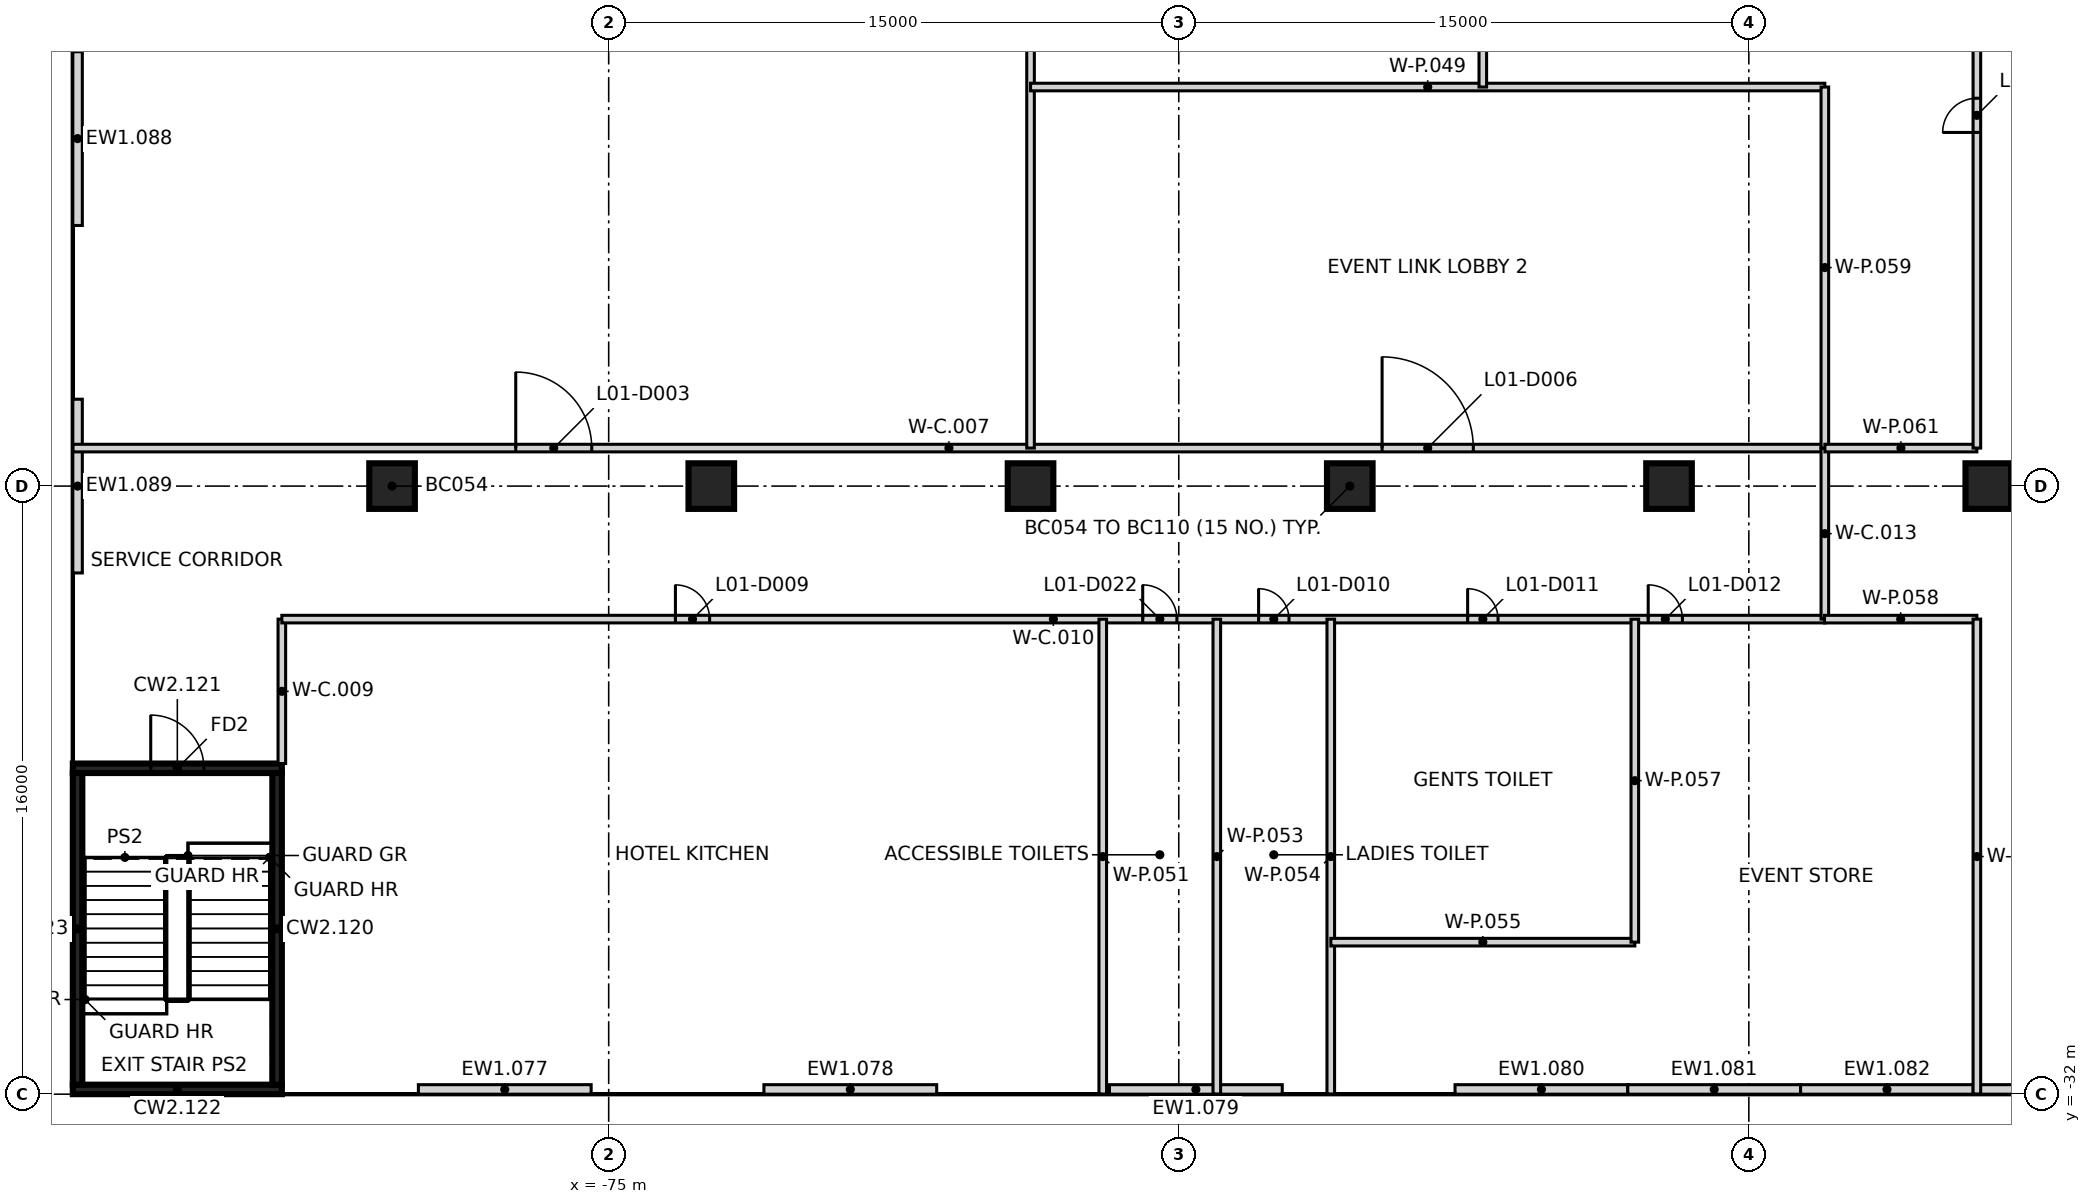
"""IFC4 building model, lengths in metres.
Left out: names, types, materials, properties, quantities, classifications, styles, units other than length and angle.
Written with IfcOpenShell. Run it as: python <this file> out.ifc"""

import sys

from ifc_helpers import new_model, si_unit, direction, frame, frame_2d, origin, origin_2d, place, context, subcontext, project, spatial, rectangle, extrude, element, fill, save


model = new_model("IFC4")
c1 = context("Model", 3, precision=1e-05, world=origin(), true_north=direction((0.0, 1.0)))
c2 = subcontext(c1, "Body", "Model", "MODEL_VIEW")
j1 = project(units=[si_unit("LENGTHUNIT", "METRE"), si_unit("PLANEANGLEUNIT", "RADIAN")], contexts=[c1])
p1 = place(None, origin())
s1 = spatial("IfcSite", under=j1, at=p1, CompositionType="ELEMENT")
p2 = place(p1, origin())
s2 = spatial("IfcBuilding", under=s1, at=p2, CompositionType="ELEMENT")
p3 = place(p2, frame((0.0, 0.0, 7.5)))
s3 = spatial("IfcBuildingStorey", under=s2, at=p3, CompositionType="ELEMENT", Elevation=7.5)
for number, where, z_axis, x_axis in (
    (1, (-80.7, -16.0, -0.4), (0.0, 0.0, 1.0), (1.0, 0.0, 0.0)),
    (2, (-72.3, -16.0, -0.4), (0.0, 0.0, 1.0), (1.0, 0.0, 0.0)),
    (3, (-63.9, -16.0, -0.4), (0.0, 0.0, 1.0), (1.0, 0.0, 0.0)),
    (4, (-55.5, -16.0, -0.4), (0.0, 0.0, 1.0), (1.0, 0.0, 0.0)),
    (5, (-47.1, -16.0, -0.4), (0.0, 0.0, 1.0), (1.0, 0.0, 0.0)),
    (6, (-38.7, -16.0, -0.4), (0.0, 0.0, 1.0), (1.0, 0.0, 0.0)),
):
    element("IfcColumn", number, at=place(p3, frame(where, z_axis=z_axis, x_axis=x_axis)), inside=s3, PredefinedType="COLUMN", context=c2, shape_type="SweptSolid", body=[
        extrude(rectangle(XDim=1.2, YDim=1.2, at=origin_2d()), origin(), (0.0, 0.0, 1.0), 6.55),
    ])
for number, where, z_axis, x_axis in (
    (7, (-88.975, -9.143, 0.0), (0.0, 0.0, 1.0), (0.0, 1.0, 0.0)),
    (8, (-88.975, -18.286, 0.0), (0.0, 0.0, 1.0), (0.0, 1.0, 0.0)),
):
    element("IfcWall", number, at=place(p3, frame(where, z_axis=z_axis, x_axis=x_axis)), inside=s3, PredefinedType="SOLIDWALL", context=c2, shape_type="SweptSolid", body=[
        extrude(rectangle(XDim=4.571, YDim=0.25, at=frame_2d((2.286, 0.0))), origin(), (0.0, 0.0, 1.0), 6.15),
    ])
p4 = place(p3, frame((-75.461, -31.875, 0.0), z_axis=(0.0, 0.0, 1.0), x_axis=(-1.0, 0.0, 0.0)))
e9 = element("IfcWall", 9, at=p4, inside=s3, PredefinedType="SOLIDWALL", context=c2, shape_type="SweptSolid", body=[
    extrude(rectangle(XDim=4.546, YDim=0.25, at=frame_2d((2.273, 0.0))), origin(), (0.0, 0.0, 1.0), 6.15),
])
for number, where, z_axis, x_axis in (
    (10, (-66.369, -31.875, 0.0), (0.0, 0.0, 1.0), (-1.0, 0.0, 0.0)),
    (11, (-57.277, -31.875, 0.0), (0.0, 0.0, 1.0), (-1.0, 0.0, 0.0)),
    (12, (-48.185, -31.875, 0.0), (0.0, 0.0, 1.0), (-1.0, 0.0, 0.0)),
    (13, (-43.638, -31.875, 0.0), (0.0, 0.0, 1.0), (-1.0, 0.0, 0.0)),
    (14, (-39.092, -31.875, 0.0), (0.0, 0.0, 1.0), (-1.0, 0.0, 0.0)),
    (15, (-34.546, -31.875, 0.0), (0.0, 0.0, 1.0), (-1.0, 0.0, 0.0)),
):
    element("IfcWall", number, at=place(p3, frame(where, z_axis=z_axis, x_axis=x_axis)), inside=s3, PredefinedType="SOLIDWALL", context=c2, shape_type="SweptSolid", body=[
        extrude(rectangle(XDim=4.546, YDim=0.25, at=frame_2d((2.273, 0.0))), origin(), (0.0, 0.0, 1.0), 6.15),
    ])
p5 = place(p3, frame((-89.1, -31.875, 0.0), z_axis=(0.0, 0.0, 1.0), x_axis=(1.0, 0.0, 0.0)))
e16 = element("IfcWall", 16, at=p5, inside=s3, PredefinedType="SHEAR", context=c2, shape_type="SweptSolid", body=[
    extrude(rectangle(XDim=5.5, YDim=0.25, at=frame_2d((2.75, 0.0))), origin(), (0.0, 0.0, 1.0), 6.15),
])
p6 = place(p3, frame((-89.1, -23.425, 0.0), z_axis=(0.0, 0.0, 1.0), x_axis=(1.0, 0.0, 0.0)))
e17 = element("IfcWall", 17, at=p6, inside=s3, PredefinedType="SHEAR", context=c2, shape_type="SweptSolid", body=[
    extrude(rectangle(XDim=5.5, YDim=0.25, at=frame_2d((2.75, 0.0))), origin(), (0.0, 0.0, 1.0), 6.15),
])
p7 = place(p6, frame((2.05, 0.0, 0.0)))
e18 = element("IfcOpeningElement", 18, at=p7, cuts=e17, PredefinedType="OPENING", context=c2, shape_type="SweptSolid", body=[
    extrude(rectangle(XDim=1.4, YDim=2.1, at=frame_2d((0.7, 1.05))), frame((0.0, 0.135, 0.0), z_axis=(0.0, -1.0, 0.0), x_axis=(1.0, 0.0, 0.0)), (0.0, 0.0, 1.0), 0.27),
])
for number, where, z_axis, x_axis in (
    (19, (-88.975, -31.75, 0.0), (0.0, 0.0, 1.0), (0.0, 1.0, 0.0)),
    (20, (-83.725, -31.75, 0.0), (0.0, 0.0, 1.0), (0.0, 1.0, 0.0)),
):
    element("IfcWall", number, at=place(p3, frame(where, z_axis=z_axis, x_axis=x_axis)), inside=s3, PredefinedType="SHEAR", context=c2, shape_type="SweptSolid", body=[
        extrude(rectangle(XDim=8.2, YDim=0.25, at=frame_2d((4.1, 0.0))), origin(), (0.0, 0.0, 1.0), 6.15),
    ])
p8 = place(p3, frame((-89.095, -15.0, 0.0), z_axis=(0.0, 0.0, 1.0), x_axis=(1.0, 0.0, 0.0)))
e21 = element("IfcWall", 21, at=p8, inside=s3, PredefinedType="PARTITIONING", context=c2, shape_type="SweptSolid", body=[
    extrude(rectangle(XDim=46.095, YDim=0.2, at=frame_2d((23.047, 0.0))), origin(), (0.0, 0.0, 1.0), 6.15),
])
p9 = place(p8, frame((11.649, 0.0, 0.0)))
e22 = element("IfcOpeningElement", 22, at=p9, cuts=e21, PredefinedType="OPENING", context=c2, shape_type="SweptSolid", body=[
    extrude(rectangle(XDim=2.0, YDim=2.1, at=frame_2d((1.0, 1.05))), frame((0.0, 0.11, 0.0), z_axis=(0.0, -1.0, 0.0), x_axis=(1.0, 0.0, 0.0)), (0.0, 0.0, 1.0), 0.22),
])
p10 = place(p8, frame((34.445, 0.0, 0.0)))
e23 = element("IfcOpeningElement", 23, at=p10, cuts=e21, PredefinedType="OPENING", context=c2, shape_type="SweptSolid", body=[
    extrude(rectangle(XDim=2.4, YDim=2.1, at=frame_2d((1.2, 1.05))), frame((0.0, 0.11, 0.0), z_axis=(0.0, -1.0, 0.0), x_axis=(1.0, 0.0, 0.0)), (0.0, 0.0, 1.0), 0.22),
])
p11 = place(p3, frame((-83.6, -23.3, 0.0), z_axis=(0.0, 0.0, 1.0), x_axis=(0.0, 1.0, 0.0)))
e24 = element("IfcWall", 24, at=p11, inside=s3, PredefinedType="PARTITIONING", context=c2, shape_type="SweptSolid", body=[
    extrude(rectangle(XDim=3.8, YDim=0.2, at=frame_2d((1.9, 0.0))), origin(), (0.0, 0.0, 1.0), 6.15),
])
p12 = place(p3, frame((-83.6, -19.5, 0.0), z_axis=(0.0, 0.0, 1.0), x_axis=(1.0, 0.0, 0.0)))
e25 = element("IfcWall", 25, at=p12, inside=s3, PredefinedType="PARTITIONING", context=c2, shape_type="SweptSolid", body=[
    extrude(rectangle(XDim=40.6, YDim=0.2, at=frame_2d((20.3, 0.0))), origin(), (0.0, 0.0, 1.0), 6.15),
])
p13 = place(p12, frame((10.356, 0.0, 0.0)))
e26 = element("IfcOpeningElement", 26, at=p13, cuts=e25, PredefinedType="OPENING", context=c2, shape_type="SweptSolid", body=[
    extrude(rectangle(XDim=0.9, YDim=2.1, at=frame_2d((0.45, 1.05))), frame((0.0, 0.11, 0.0), z_axis=(0.0, -1.0, 0.0), x_axis=(1.0, 0.0, 0.0)), (0.0, 0.0, 1.0), 0.22),
])
p14 = place(p12, frame((25.7, 0.0, 0.0)))
e27 = element("IfcOpeningElement", 27, at=p14, cuts=e25, PredefinedType="OPENING", context=c2, shape_type="SweptSolid", body=[
    extrude(rectangle(XDim=0.8, YDim=2.1, at=frame_2d((0.4, 1.05))), frame((0.0, 0.11, 0.0), z_axis=(0.0, -1.0, 0.0), x_axis=(1.0, 0.0, 0.0)), (0.0, 0.0, 1.0), 0.22),
])
p15 = place(p12, frame((31.201, 0.0, 0.0)))
e28 = element("IfcOpeningElement", 28, at=p15, cuts=e25, PredefinedType="OPENING", context=c2, shape_type="SweptSolid", body=[
    extrude(rectangle(XDim=0.8, YDim=2.1, at=frame_2d((0.4, 1.05))), frame((0.0, 0.11, 0.0), z_axis=(0.0, -1.0, 0.0), x_axis=(1.0, 0.0, 0.0)), (0.0, 0.0, 1.0), 0.22),
])
p16 = place(p12, frame((35.952, 0.0, 0.0)))
e29 = element("IfcOpeningElement", 29, at=p16, cuts=e25, PredefinedType="OPENING", context=c2, shape_type="SweptSolid", body=[
    extrude(rectangle(XDim=0.9, YDim=2.1, at=frame_2d((0.45, 1.05))), frame((0.0, 0.11, 0.0), z_axis=(0.0, -1.0, 0.0), x_axis=(1.0, 0.0, 0.0)), (0.0, 0.0, 1.0), 0.22),
])
p17 = place(p12, frame((22.652, 0.0, 0.0)))
e30 = element("IfcOpeningElement", 30, at=p17, cuts=e25, PredefinedType="OPENING", context=c2, shape_type="SweptSolid", body=[
    extrude(rectangle(XDim=0.9, YDim=2.1, at=frame_2d((0.45, 1.05))), frame((0.0, 0.11, 0.0), z_axis=(0.0, -1.0, 0.0), x_axis=(1.0, 0.0, 0.0)), (0.0, 0.0, 1.0), 0.22),
])
p18 = place(p3, frame((-43.0, -19.5, 0.0), z_axis=(0.0, 0.0, 1.0), x_axis=(0.0, 1.0, 0.0)))
e31 = element("IfcWall", 31, at=p18, inside=s3, PredefinedType="PARTITIONING", context=c2, shape_type="SweptSolid", body=[
    extrude(rectangle(XDim=4.498, YDim=0.2, at=frame_2d((2.249, 0.0))), origin(), (0.0, 0.0, 1.0), 6.15),
])
p19 = place(p3, frame((-63.9, -15.0, 0.0), z_axis=(0.0, 0.0, 1.0), x_axis=(0.0, 1.0, 0.0)))
e32 = element("IfcWall", 32, at=p19, inside=s3, PredefinedType="PARTITIONING", context=c2, shape_type="SweptSolid", body=[
    extrude(rectangle(XDim=30.0, YDim=0.2, at=frame_2d((15.0, 0.0))), origin(), (0.0, 0.0, 1.0), 6.15),
])
p20 = place(p19, frame((11.25, 0.0, 0.0)))
e33 = element("IfcOpeningElement", 33, at=p20, cuts=e32, PredefinedType="OPENING", context=c2, shape_type="SweptSolid", body=[
    extrude(rectangle(XDim=2.0, YDim=2.1, at=frame_2d((1.0, 1.05))), frame((0.0, 0.11, 0.0), z_axis=(0.0, -1.0, 0.0), x_axis=(1.0, 0.0, 0.0)), (0.0, 0.0, 1.0), 0.22),
])
p21 = place(p3, frame((-63.9, -5.5, 0.0), z_axis=(0.0, 0.0, 1.0), x_axis=(1.0, 0.0, 0.0)))
e34 = element("IfcWall", 34, at=p21, inside=s3, PredefinedType="PARTITIONING", context=c2, shape_type="SweptSolid", body=[
    extrude(rectangle(XDim=20.9, YDim=0.2, at=frame_2d((10.45, 0.0))), origin(), (0.0, 0.0, 1.0), 6.15),
])
for number, where, z_axis, x_axis in (
    (35, (-62.0, -31.995, 0.0), (0.0, 0.0, 1.0), (0.0, 1.0, 0.0)),
    (36, (-58.999, -31.995, 0.0), (0.0, 0.0, 1.0), (0.0, 1.0, 0.0)),
    (37, (-56.0, -31.995, 0.0), (0.0, 0.0, 1.0), (0.0, 1.0, 0.0)),
):
    element("IfcWall", number, at=place(p3, frame(where, z_axis=z_axis, x_axis=x_axis)), inside=s3, PredefinedType="PARTITIONING", context=c2, shape_type="SweptSolid", body=[
        extrude(rectangle(XDim=12.493, YDim=0.2, at=frame_2d((6.247, 0.0))), origin(), (0.0, 0.0, 1.0), 6.15),
    ])
p22 = place(p3, frame((-55.998, -28.0, 0.0), z_axis=(0.0, 0.0, 1.0), x_axis=(1.0, 0.0, 0.0)))
e38 = element("IfcWall", 38, at=p22, inside=s3, PredefinedType="PARTITIONING", context=c2, shape_type="SweptSolid", body=[
    extrude(rectangle(XDim=7.998, YDim=0.2, at=frame_2d((3.999, 0.0))), origin(), (0.0, 0.0, 1.0), 6.15),
])
p23 = place(p3, frame((-52.0, -5.5, 0.0), z_axis=(0.0, 0.0, 1.0), x_axis=(0.0, 1.0, 0.0)))
e39 = element("IfcWall", 39, at=p23, inside=s3, PredefinedType="PARTITIONING", context=c2, shape_type="SweptSolid", body=[
    extrude(rectangle(XDim=11.0, YDim=0.2, at=frame_2d((5.5, 0.0))), origin(), (0.0, 0.0, 1.0), 6.15),
])
p24 = place(p23, frame((4.3, 0.0, 0.0)))
e40 = element("IfcOpeningElement", 40, at=p24, cuts=e39, PredefinedType="OPENING", context=c2, shape_type="SweptSolid", body=[
    extrude(rectangle(XDim=2.4, YDim=2.1, at=frame_2d((1.2, 1.05))), frame((0.0, 0.11, 0.0), z_axis=(0.0, -1.0, 0.0), x_axis=(1.0, 0.0, 0.0)), (0.0, 0.0, 1.0), 0.22),
])
p25 = place(p3, frame((-48.0, -28.0, 0.0), z_axis=(0.0, 0.0, 1.0), x_axis=(0.0, 1.0, 0.0)))
e41 = element("IfcWall", 41, at=p25, inside=s3, PredefinedType="PARTITIONING", context=c2, shape_type="SweptSolid", body=[
    extrude(rectangle(XDim=8.498, YDim=0.2, at=frame_2d((4.249, 0.0))), origin(), (0.0, 0.0, 1.0), 6.15),
])
p26 = place(p3, frame((-43.009, -19.501, 0.0), z_axis=(0.0, 0.0, 1.0), x_axis=(0.999999970332, 0.000243590517, 0.0)))
e42 = element("IfcWall", 42, at=p26, inside=s3, PredefinedType="PARTITIONING", context=c2, shape_type="SweptSolid", body=[
    extrude(rectangle(XDim=4.009, YDim=0.2, at=frame_2d((2.004, 0.0))), origin(), (0.0, 0.0, 1.0), 6.15),
])
p27 = place(p3, frame((-43.0, -15.0, 0.0), z_axis=(0.0, 0.0, 1.0), x_axis=(0.0, 1.0, 0.0)))
e43 = element("IfcWall", 43, at=p27, inside=s3, PredefinedType="PARTITIONING", context=c2, shape_type="SweptSolid", body=[
    extrude(rectangle(XDim=9.5, YDim=0.2, at=frame_2d((4.75, 0.0))), origin(), (0.0, 0.0, 1.0), 6.15),
])
p28 = place(p3, frame((-42.998, -15.0, 0.0), z_axis=(0.0, 0.0, 1.0), x_axis=(1.0, 0.0, 0.0)))
e44 = element("IfcWall", 44, at=p28, inside=s3, PredefinedType="PARTITIONING", context=c2, shape_type="SweptSolid", body=[
    extrude(rectangle(XDim=3.998, YDim=0.2, at=frame_2d((1.999, 0.0))), origin(), (0.0, 0.0, 1.0), 6.15),
])
p29 = place(p3, frame((-39.0, -31.995, 0.0), z_axis=(0.0, 0.0, 1.0), x_axis=(0.0, 1.0, 0.0)))
e45 = element("IfcWall", 45, at=p29, inside=s3, PredefinedType="PARTITIONING", context=c2, shape_type="SweptSolid", body=[
    extrude(rectangle(XDim=12.495, YDim=0.2, at=frame_2d((6.248, 0.0))), origin(), (0.0, 0.0, 1.0), 6.15),
])
p30 = place(p3, frame((-39.0, -15.0, 0.0), z_axis=(0.0, 0.0, 1.0), x_axis=(0.0, 1.0, 0.0)))
e46 = element("IfcWall", 46, at=p30, inside=s3, PredefinedType="PARTITIONING", context=c2, shape_type="SweptSolid", body=[
    extrude(rectangle(XDim=30.0, YDim=0.2, at=frame_2d((15.0, 0.0))), origin(), (0.0, 0.0, 1.0), 6.15),
])
p31 = place(p30, frame((20.75, 0.0, 0.0)))
e47 = element("IfcOpeningElement", 47, at=p31, cuts=e46, PredefinedType="OPENING", context=c2, shape_type="SweptSolid", body=[
    extrude(rectangle(XDim=2.4, YDim=2.1, at=frame_2d((1.2, 1.05))), frame((0.0, 0.11, 0.0), z_axis=(0.0, -1.0, 0.0), x_axis=(1.0, 0.0, 0.0)), (0.0, 0.0, 1.0), 0.22),
])
p32 = place(p30, frame((8.305, 0.0, 0.0)))
e48 = element("IfcOpeningElement", 48, at=p32, cuts=e46, PredefinedType="OPENING", context=c2, shape_type="SweptSolid", body=[
    extrude(rectangle(XDim=0.9, YDim=2.1, at=frame_2d((0.45, 1.05))), frame((0.0, 0.11, 0.0), z_axis=(0.0, -1.0, 0.0), x_axis=(1.0, 0.0, 0.0)), (0.0, 0.0, 1.0), 0.22),
])
p33 = place(p7, origin())
e49 = element("IfcDoor", 49, at=p33, inside=s3, OperationType="SINGLE_SWING_LEFT", PredefinedType="DOOR", context=c2, shape_type="SweptSolid", body=[
    extrude(rectangle(XDim=1.4, YDim=2.1, at=frame_2d((0.7, 1.05))), frame((0.0, 0.025, 0.0), z_axis=(0.0, -1.0, 0.0), x_axis=(1.0, 0.0, 0.0)), (0.0, 0.0, 1.0), 0.05),
])
fill(e18, e49)
p34 = place(p9, origin())
e50 = element("IfcDoor", 50, at=p34, inside=s3, OperationType="DOUBLE_DOOR_SINGLE_SWING", PredefinedType="DOOR", context=c2, shape_type="SweptSolid", body=[
    extrude(rectangle(XDim=2.0, YDim=2.1, at=frame_2d((1.0, 1.05))), frame((0.0, 0.025, 0.0), z_axis=(0.0, -1.0, 0.0), x_axis=(1.0, 0.0, 0.0)), (0.0, 0.0, 1.0), 0.05),
])
fill(e22, e50)
p35 = place(p10, origin())
e51 = element("IfcDoor", 51, at=p35, inside=s3, OperationType="DOUBLE_DOOR_SINGLE_SWING", PredefinedType="DOOR", context=c2, shape_type="SweptSolid", body=[
    extrude(rectangle(XDim=2.4, YDim=2.1, at=frame_2d((1.2, 1.05))), frame((0.0, 0.025, 0.0), z_axis=(0.0, -1.0, 0.0), x_axis=(1.0, 0.0, 0.0)), (0.0, 0.0, 1.0), 0.05),
])
fill(e23, e51)
p36 = place(p13, frame((0.9, 0.0, 0.0), z_axis=(0.0, 0.0, 1.0), x_axis=(-1.0, 0.0, 0.0)))
e52 = element("IfcDoor", 52, at=p36, inside=s3, OperationType="SINGLE_SWING_LEFT", PredefinedType="DOOR", context=c2, shape_type="SweptSolid", body=[
    extrude(rectangle(XDim=0.9, YDim=2.1, at=frame_2d((0.45, 1.05))), frame((0.0, 0.025, 0.0), z_axis=(0.0, -1.0, 0.0), x_axis=(1.0, 0.0, 0.0)), (0.0, 0.0, 1.0), 0.05),
])
fill(e26, e52)
p37 = place(p14, frame((0.8, 0.0, 0.0), z_axis=(0.0, 0.0, 1.0), x_axis=(-1.0, 0.0, 0.0)))
e53 = element("IfcDoor", 53, at=p37, inside=s3, OperationType="SINGLE_SWING_LEFT", PredefinedType="DOOR", context=c2, shape_type="SweptSolid", body=[
    extrude(rectangle(XDim=0.8, YDim=2.1, at=frame_2d((0.4, 1.05))), frame((0.0, 0.025, 0.0), z_axis=(0.0, -1.0, 0.0), x_axis=(1.0, 0.0, 0.0)), (0.0, 0.0, 1.0), 0.05),
])
fill(e27, e53)
p38 = place(p15, frame((0.8, 0.0, 0.0), z_axis=(0.0, 0.0, 1.0), x_axis=(-1.0, 0.0, 0.0)))
e54 = element("IfcDoor", 54, at=p38, inside=s3, OperationType="SINGLE_SWING_LEFT", PredefinedType="DOOR", context=c2, shape_type="SweptSolid", body=[
    extrude(rectangle(XDim=0.8, YDim=2.1, at=frame_2d((0.4, 1.05))), frame((0.0, 0.025, 0.0), z_axis=(0.0, -1.0, 0.0), x_axis=(1.0, 0.0, 0.0)), (0.0, 0.0, 1.0), 0.05),
])
fill(e28, e54)
p39 = place(p16, frame((0.9, 0.0, 0.0), z_axis=(0.0, 0.0, 1.0), x_axis=(-1.0, 0.0, 0.0)))
e55 = element("IfcDoor", 55, at=p39, inside=s3, OperationType="SINGLE_SWING_LEFT", PredefinedType="DOOR", context=c2, shape_type="SweptSolid", body=[
    extrude(rectangle(XDim=0.9, YDim=2.1, at=frame_2d((0.45, 1.05))), frame((0.0, 0.025, 0.0), z_axis=(0.0, -1.0, 0.0), x_axis=(1.0, 0.0, 0.0)), (0.0, 0.0, 1.0), 0.05),
])
fill(e29, e55)
p40 = place(p32, frame((0.9, 0.0, 0.0), z_axis=(0.0, 0.0, 1.0), x_axis=(-1.0, 0.0, 0.0)))
e56 = element("IfcDoor", 56, at=p40, inside=s3, OperationType="SINGLE_SWING_LEFT", PredefinedType="DOOR", context=c2, shape_type="SweptSolid", body=[
    extrude(rectangle(XDim=0.9, YDim=2.1, at=frame_2d((0.45, 1.05))), frame((0.0, 0.025, 0.0), z_axis=(0.0, -1.0, 0.0), x_axis=(1.0, 0.0, 0.0)), (0.0, 0.0, 1.0), 0.05),
])
fill(e48, e56)
p41 = place(p17, frame((0.9, 0.0, 0.0), z_axis=(0.0, 0.0, 1.0), x_axis=(-1.0, 0.0, 0.0)))
e57 = element("IfcDoor", 57, at=p41, inside=s3, OperationType="SINGLE_SWING_LEFT", PredefinedType="DOOR", context=c2, shape_type="SweptSolid", body=[
    extrude(rectangle(XDim=0.9, YDim=2.1, at=frame_2d((0.45, 1.05))), frame((0.0, 0.025, 0.0), z_axis=(0.0, -1.0, 0.0), x_axis=(1.0, 0.0, 0.0)), (0.0, 0.0, 1.0), 0.05),
])
fill(e30, e57)
save(model, sys.argv[1])
